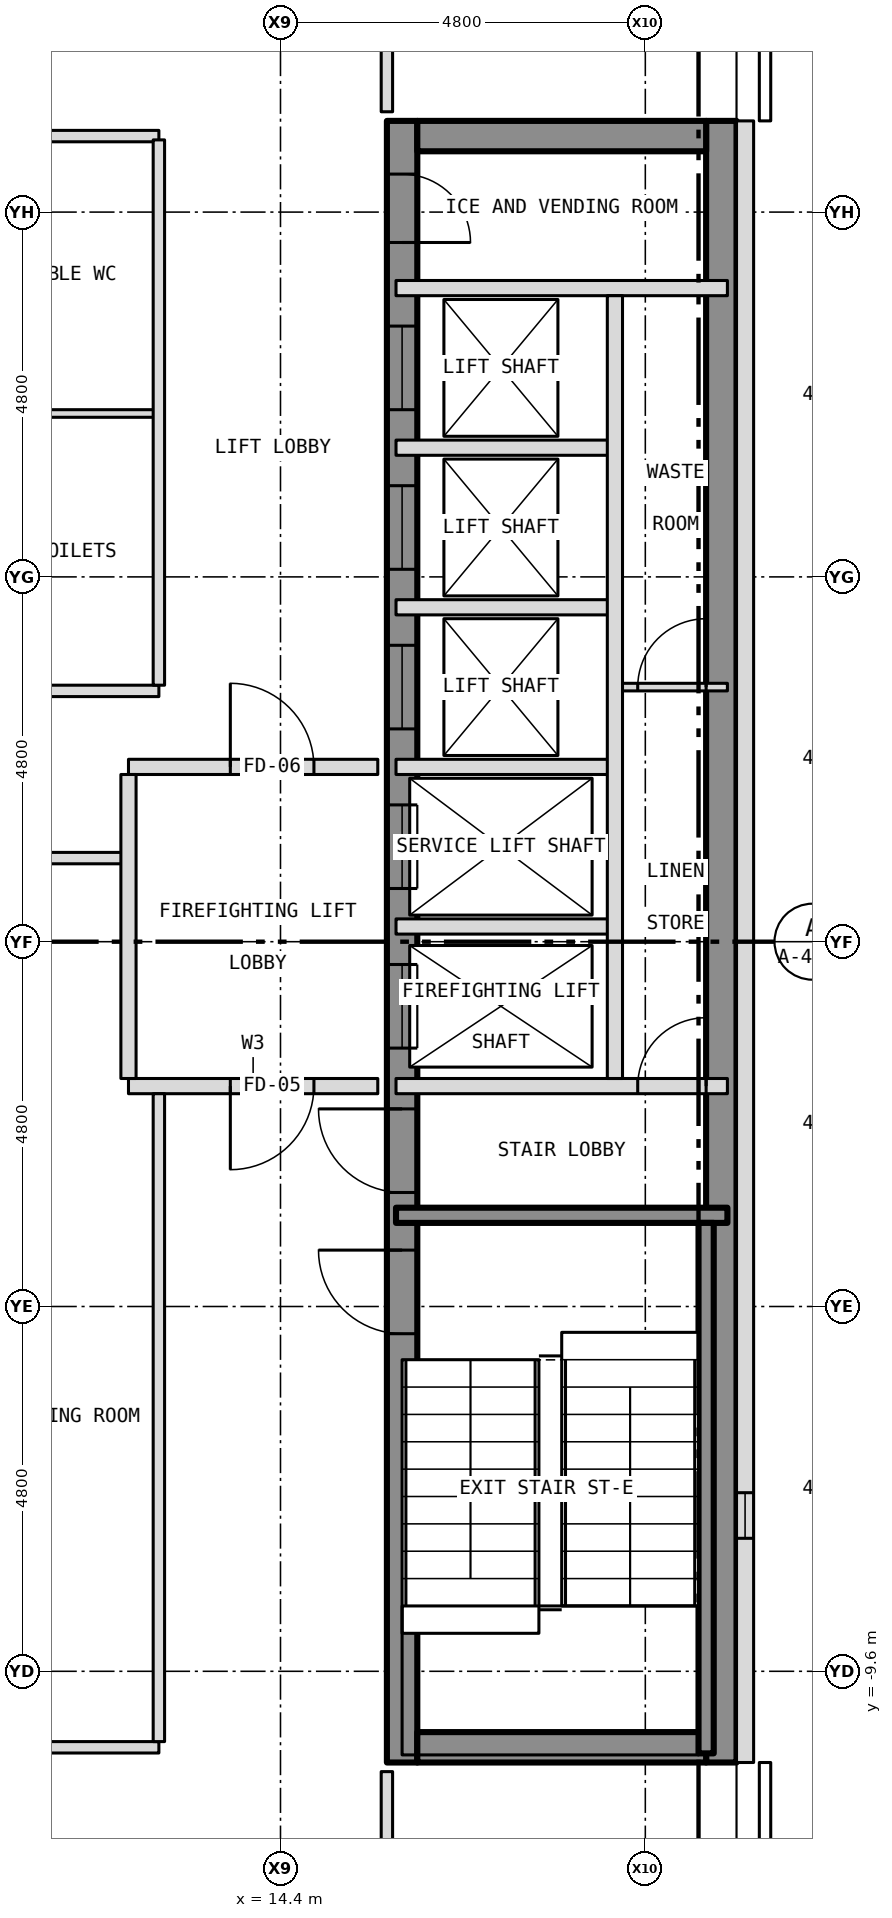
"""IFC4 building model, lengths in metres.
Left out: names, types, materials, properties, quantities, classifications, styles, units other than length and angle.
Written with IfcOpenShell. Run it as: python <this file> out.ifc"""

import sys

from ifc_helpers import new_model, si_unit, direction, frame, frame_2d, origin, place, context, subcontext, project, spatial, rectangle, extrude, element, fill, save


model = new_model("IFC4")
c1 = context("Model", 3, precision=1e-05, world=origin(), true_north=direction((0.0, 1.0)))
c2 = subcontext(c1, "Body", "Model", "MODEL_VIEW")
j1 = project(units=[si_unit("LENGTHUNIT", "METRE"), si_unit("PLANEANGLEUNIT", "RADIAN")], contexts=[c1])
p1 = place(None, origin())
s1 = spatial("IfcSite", under=j1, at=p1, CompositionType="ELEMENT")
p2 = place(p1, origin())
s2 = spatial("IfcBuilding", under=s1, at=p2, CompositionType="ELEMENT")
p3 = place(p2, frame((0.0, 0.0, 248.0)))
s3 = spatial("IfcBuildingStorey", under=s2, at=p3, CompositionType="ELEMENT", Elevation=248.0)
p4 = place(p3, frame((16.0, -10.8, 0.0), z_axis=(0.0, 0.0, 1.0), x_axis=(0.0, 1.0, 0.0)))
e1 = element("IfcWall", 1, at=p4, inside=s3, PredefinedType="SHEAR", context=c2, shape_type="SweptSolid", body=[
    extrude(rectangle(XDim=21.6, YDim=0.4, at=frame_2d((10.8, 0.0))), origin(), (0.0, 0.0, 1.0), 3.25),
])
p5 = place(p4, frame((9.4, 0.0, 0.0)))
e2 = element("IfcOpeningElement", 2, at=p5, cuts=e1, PredefinedType="OPENING", context=c2, shape_type="SweptSolid", body=[
    extrude(rectangle(XDim=1.1, YDim=2.1, at=frame_2d((0.55, 1.05))), frame((0.0, 0.212, 0.0), z_axis=(0.0, -1.0, 0.0), x_axis=(1.0, 0.0, 0.0)), (0.0, 0.0, 1.0), 0.424),
])
p6 = place(p4, frame((11.5, 0.0, 0.0)))
e3 = element("IfcOpeningElement", 3, at=p6, cuts=e1, PredefinedType="OPENING", context=c2, shape_type="SweptSolid", body=[
    extrude(rectangle(XDim=1.1, YDim=2.1, at=frame_2d((0.55, 1.05))), frame((0.0, 0.212, 0.0), z_axis=(0.0, -1.0, 0.0), x_axis=(1.0, 0.0, 0.0)), (0.0, 0.0, 1.0), 0.424),
])
p7 = place(p4, frame((13.6, 0.0, 0.0)))
e4 = element("IfcOpeningElement", 4, at=p7, cuts=e1, PredefinedType="OPENING", context=c2, shape_type="SweptSolid", body=[
    extrude(rectangle(XDim=1.1, YDim=2.1, at=frame_2d((0.55, 1.05))), frame((0.0, 0.212, 0.0), z_axis=(0.0, -1.0, 0.0), x_axis=(1.0, 0.0, 0.0)), (0.0, 0.0, 1.0), 0.424),
])
p8 = place(p4, frame((15.7, 0.0, 0.0)))
e5 = element("IfcOpeningElement", 5, at=p8, cuts=e1, PredefinedType="OPENING", context=c2, shape_type="SweptSolid", body=[
    extrude(rectangle(XDim=1.1, YDim=2.1, at=frame_2d((0.55, 1.05))), frame((0.0, 0.212, 0.0), z_axis=(0.0, -1.0, 0.0), x_axis=(1.0, 0.0, 0.0)), (0.0, 0.0, 1.0), 0.424),
])
p9 = place(p4, frame((17.8, 0.0, 0.0)))
e6 = element("IfcOpeningElement", 6, at=p9, cuts=e1, PredefinedType="OPENING", context=c2, shape_type="SweptSolid", body=[
    extrude(rectangle(XDim=1.1, YDim=2.1, at=frame_2d((0.55, 1.05))), frame((0.0, 0.212, 0.0), z_axis=(0.0, -1.0, 0.0), x_axis=(1.0, 0.0, 0.0)), (0.0, 0.0, 1.0), 0.424),
])
p10 = place(p4, frame((5.642, 0.0, 0.0)))
e7 = element("IfcOpeningElement", 7, at=p10, cuts=e1, PredefinedType="OPENING", context=c2, shape_type="SweptSolid", body=[
    extrude(rectangle(XDim=1.1, YDim=2.1, at=frame_2d((0.55, 1.05))), frame((0.0, 0.212, 0.0), z_axis=(0.0, -1.0, 0.0), x_axis=(1.0, 0.0, 0.0)), (0.0, 0.0, 1.0), 0.424),
])
p11 = place(p4, frame((7.5, 0.0, 0.0)))
e8 = element("IfcOpeningElement", 8, at=p11, cuts=e1, PredefinedType="OPENING", context=c2, shape_type="SweptSolid", body=[
    extrude(rectangle(XDim=1.1, YDim=2.1, at=frame_2d((0.55, 1.05))), frame((0.0, 0.212, 0.0), z_axis=(0.0, -1.0, 0.0), x_axis=(1.0, 0.0, 0.0)), (0.0, 0.0, 1.0), 0.424),
])
p12 = place(p4, frame((20.0, 0.0, 0.0)))
e9 = element("IfcOpeningElement", 9, at=p12, cuts=e1, PredefinedType="OPENING", context=c2, shape_type="SweptSolid", body=[
    extrude(rectangle(XDim=0.9, YDim=2.1, at=frame_2d((0.45, 1.05))), frame((0.0, 0.212, 0.0), z_axis=(0.0, -1.0, 0.0), x_axis=(1.0, 0.0, 0.0)), (0.0, 0.0, 1.0), 0.424),
])
p13 = place(p3, frame((20.2, -10.8, 0.0), z_axis=(0.0, 0.0, 1.0), x_axis=(0.0, 1.0, 0.0)))
e10 = element("IfcWall", 10, at=p13, inside=s3, PredefinedType="SHEAR", context=c2, shape_type="SweptSolid", body=[
    extrude(rectangle(XDim=21.6, YDim=0.4, at=frame_2d((10.8, 0.0))), origin(), (0.0, 0.0, 1.0), 3.25),
])
for number, where, z_axis, x_axis in (
    (11, (16.2, 10.6, 0.0), (0.0, 0.0, 1.0), (1.0, 0.0, 0.0)),
    (12, (16.2, -10.6, 0.0), (0.0, 0.0, 1.0), (1.0, 0.0, 0.0)),
):
    element("IfcWall", number, at=place(p3, frame(where, z_axis=z_axis, x_axis=x_axis)), inside=s3, PredefinedType="SHEAR", context=c2, shape_type="SweptSolid", body=[
        extrude(rectangle(XDim=3.8, YDim=0.4, at=frame_2d((1.9, 0.0))), origin(), (0.0, 0.0, 1.0), 3.25),
    ])
p14 = place(p3, frame((20.512, -10.8, 0.0), z_axis=(0.0, 0.0, 1.0), x_axis=(0.0, 1.0, 0.0)))
e13 = element("IfcWall", 13, at=p14, inside=s3, PredefinedType="SOLIDWALL", context=c2, shape_type="SweptSolid", body=[
    extrude(rectangle(XDim=21.6, YDim=0.225, at=frame_2d((10.8, 0.0))), origin(), (0.0, 0.0, 1.0), 3.5),
])
p15 = place(p14, frame((2.95, 0.0, 1.0)))
e14 = element("IfcOpeningElement", 14, at=p15, cuts=e13, PredefinedType="OPENING", context=c2, shape_type="SweptSolid", body=[
    extrude(rectangle(XDim=0.6, YDim=1.5, at=frame_2d((0.3, 0.75))), frame((0.0, 0.125, 0.0), z_axis=(0.0, -1.0, 0.0), x_axis=(1.0, 0.0, 0.0)), (0.0, 0.0, 1.0), 0.249),
])
p16 = place(p3, frame((9.7, -10.6, 0.0), z_axis=(0.0, 0.0, 1.0), x_axis=(1.0, 0.0, 0.0)))
e15 = element("IfcWall", 15, at=p16, inside=s3, PredefinedType="PARTITIONING", context=c2, shape_type="SweptSolid", body=[
    extrude(rectangle(XDim=3.1, YDim=0.15, at=frame_2d((1.55, 0.0))), origin(), (0.0, 0.0, 1.0), 3.35),
])
p17 = place(p3, frame((15.92, -3.6, 0.0), z_axis=(0.0, 0.0, 1.0), x_axis=(1.0, 0.0, 0.0)))
e16 = element("IfcWall", 16, at=p17, inside=s3, PredefinedType="SHEAR", context=c2, shape_type="SweptSolid", body=[
    extrude(rectangle(XDim=4.36, YDim=0.2, at=frame_2d((2.18, 0.0))), origin(), (0.0, 0.0, 1.0), 3.25),
])
p18 = place(p3, frame((12.4, -1.9, 0.0), z_axis=(0.0, 0.0, 1.0), x_axis=(1.0, 0.0, 0.0)))
e17 = element("IfcWall", 17, at=p18, inside=s3, PredefinedType="PARTITIONING", context=c2, shape_type="SweptSolid", body=[
    extrude(rectangle(XDim=3.28, YDim=0.2, at=frame_2d((1.64, 0.0))), origin(), (0.0, 0.0, 1.0), 3.35),
])
p19 = place(p18, frame((1.34, 0.0, 0.0)))
e18 = element("IfcOpeningElement", 18, at=p19, cuts=e17, PredefinedType="OPENING", context=c2, shape_type="SweptSolid", body=[
    extrude(rectangle(XDim=1.1, YDim=2.1, at=frame_2d((0.55, 1.05))), frame((0.0, 0.112, 0.0), z_axis=(0.0, -1.0, 0.0), x_axis=(1.0, 0.0, 0.0)), (0.0, 0.0, 1.0), 0.224),
])
p20 = place(p3, frame((15.92, -1.9, 0.0), z_axis=(0.0, 0.0, 1.0), x_axis=(1.0, 0.0, 0.0)))
e19 = element("IfcWall", 19, at=p20, inside=s3, PredefinedType="PARTITIONING", context=c2, shape_type="SweptSolid", body=[
    extrude(rectangle(XDim=4.36, YDim=0.2, at=frame_2d((2.18, 0.0))), origin(), (0.0, 0.0, 1.0), 3.25),
])
p21 = place(p20, frame((3.18, 0.0, 0.0)))
e20 = element("IfcOpeningElement", 20, at=p21, cuts=e19, PredefinedType="OPENING", context=c2, shape_type="SweptSolid", body=[
    extrude(rectangle(XDim=0.9, YDim=2.1, at=frame_2d((0.45, 1.05))), frame((0.0, 0.112, 0.0), z_axis=(0.0, -1.0, 0.0), x_axis=(1.0, 0.0, 0.0)), (0.0, 0.0, 1.0), 0.224),
])
p22 = place(p3, frame((15.92, 0.2, 0.0), z_axis=(0.0, 0.0, 1.0), x_axis=(1.0, 0.0, 0.0)))
e21 = element("IfcWall", 21, at=p22, inside=s3, PredefinedType="PARTITIONING", context=c2, shape_type="SweptSolid", body=[
    extrude(rectangle(XDim=2.88, YDim=0.2, at=frame_2d((1.44, 0.0))), origin(), (0.0, 0.0, 1.0), 3.25),
])
p23 = place(p3, frame((9.7, 1.1, 0.0), z_axis=(0.0, 0.0, 1.0), x_axis=(1.0, 0.0, 0.0)))
e22 = element("IfcWall", 22, at=p23, inside=s3, PredefinedType="PARTITIONING", context=c2, shape_type="SweptSolid", body=[
    extrude(rectangle(XDim=2.7, YDim=0.15, at=frame_2d((1.35, 0.0))), origin(), (0.0, 0.0, 1.0), 3.35),
])
p24 = place(p3, frame((12.4, 2.3, 0.0), z_axis=(0.0, 0.0, 1.0), x_axis=(1.0, 0.0, 0.0)))
e23 = element("IfcWall", 23, at=p24, inside=s3, PredefinedType="PARTITIONING", context=c2, shape_type="SweptSolid", body=[
    extrude(rectangle(XDim=3.28, YDim=0.2, at=frame_2d((1.64, 0.0))), origin(), (0.0, 0.0, 1.0), 3.35),
])
p25 = place(p24, frame((1.34, 0.0, 0.0)))
e24 = element("IfcOpeningElement", 24, at=p25, cuts=e23, PredefinedType="OPENING", context=c2, shape_type="SweptSolid", body=[
    extrude(rectangle(XDim=1.1, YDim=2.1, at=frame_2d((0.55, 1.05))), frame((0.0, 0.112, 0.0), z_axis=(0.0, -1.0, 0.0), x_axis=(1.0, 0.0, 0.0)), (0.0, 0.0, 1.0), 0.224),
])
p26 = place(p3, frame((15.92, 2.3, 0.0), z_axis=(0.0, 0.0, 1.0), x_axis=(1.0, 0.0, 0.0)))
e25 = element("IfcWall", 25, at=p26, inside=s3, PredefinedType="PARTITIONING", context=c2, shape_type="SweptSolid", body=[
    extrude(rectangle(XDim=2.88, YDim=0.2, at=frame_2d((1.44, 0.0))), origin(), (0.0, 0.0, 1.0), 3.25),
])
p27 = place(p3, frame((9.7, 3.3, 0.0), z_axis=(0.0, 0.0, 1.0), x_axis=(1.0, 0.0, 0.0)))
e26 = element("IfcWall", 26, at=p27, inside=s3, PredefinedType="PARTITIONING", context=c2, shape_type="SweptSolid", body=[
    extrude(rectangle(XDim=3.1, YDim=0.15, at=frame_2d((1.55, 0.0))), origin(), (0.0, 0.0, 1.0), 3.35),
])
p28 = place(p3, frame((18.8, 3.35, 0.0), z_axis=(0.0, 0.0, 1.0), x_axis=(1.0, 0.0, 0.0)))
e27 = element("IfcWall", 27, at=p28, inside=s3, PredefinedType="PARTITIONING", context=c2, shape_type="SweptSolid", body=[
    extrude(rectangle(XDim=1.48, YDim=0.1, at=frame_2d((0.74, 0.0))), origin(), (0.0, 0.0, 1.0), 3.25),
])
p29 = place(p28, frame((0.3, 0.0, 0.0)))
e28 = element("IfcOpeningElement", 28, at=p29, cuts=e27, PredefinedType="OPENING", context=c2, shape_type="SweptSolid", body=[
    extrude(rectangle(XDim=0.9, YDim=2.1, at=frame_2d((0.45, 1.05))), frame((0.0, 0.062, 0.0), z_axis=(0.0, -1.0, 0.0), x_axis=(1.0, 0.0, 0.0)), (0.0, 0.0, 1.0), 0.124),
])
for number, where, z_axis, x_axis in (
    (29, (15.92, 4.4, 0.0), (0.0, 0.0, 1.0), (1.0, 0.0, 0.0)),
    (30, (15.92, 6.5, 0.0), (0.0, 0.0, 1.0), (1.0, 0.0, 0.0)),
):
    element("IfcWall", number, at=place(p3, frame(where, z_axis=z_axis, x_axis=x_axis)), inside=s3, PredefinedType="PARTITIONING", context=c2, shape_type="SweptSolid", body=[
        extrude(rectangle(XDim=2.88, YDim=0.2, at=frame_2d((1.44, 0.0))), origin(), (0.0, 0.0, 1.0), 3.25),
    ])
p30 = place(p3, frame((9.7, 6.95, 0.0), z_axis=(0.0, 0.0, 1.0), x_axis=(1.0, 0.0, 0.0)))
e31 = element("IfcWall", 31, at=p30, inside=s3, PredefinedType="PARTITIONING", context=c2, shape_type="SweptSolid", body=[
    extrude(rectangle(XDim=3.1, YDim=0.1, at=frame_2d((1.55, 0.0))), origin(), (0.0, 0.0, 1.0), 3.35),
])
p31 = place(p3, frame((15.92, 8.6, 0.0), z_axis=(0.0, 0.0, 1.0), x_axis=(1.0, 0.0, 0.0)))
e32 = element("IfcWall", 32, at=p31, inside=s3, PredefinedType="PARTITIONING", context=c2, shape_type="SweptSolid", body=[
    extrude(rectangle(XDim=4.36, YDim=0.2, at=frame_2d((2.18, 0.0))), origin(), (0.0, 0.0, 1.0), 3.25),
])
p32 = place(p3, frame((9.7, 10.6, 0.0), z_axis=(0.0, 0.0, 1.0), x_axis=(1.0, 0.0, 0.0)))
e33 = element("IfcWall", 33, at=p32, inside=s3, PredefinedType="PARTITIONING", context=c2, shape_type="SweptSolid", body=[
    extrude(rectangle(XDim=3.1, YDim=0.15, at=frame_2d((1.55, 0.0))), origin(), (0.0, 0.0, 1.0), 3.35),
])
p33 = place(p3, frame((12.4, -1.8, 0.0), z_axis=(0.0, 0.0, 1.0), x_axis=(0.0, 1.0, 0.0)))
e34 = element("IfcWall", 34, at=p33, inside=s3, PredefinedType="PARTITIONING", context=c2, shape_type="SweptSolid", body=[
    extrude(rectangle(XDim=4.0, YDim=0.2, at=frame_2d((2.0, 0.0))), origin(), (0.0, 0.0, 1.0), 3.35),
])
p34 = place(p3, frame((12.8, -10.525, 0.0), z_axis=(0.0, 0.0, 1.0), x_axis=(0.0, 1.0, 0.0)))
e35 = element("IfcWall", 35, at=p34, inside=s3, PredefinedType="PARTITIONING", context=c2, shape_type="SweptSolid", body=[
    extrude(rectangle(XDim=8.525, YDim=0.15, at=frame_2d((4.262, 0.0))), origin(), (0.0, 0.0, 1.0), 3.35),
])
p35 = place(p3, frame((12.8, 3.375, 0.0), z_axis=(0.0, 0.0, 1.0), x_axis=(0.0, 1.0, 0.0)))
e36 = element("IfcWall", 36, at=p35, inside=s3, PredefinedType="PARTITIONING", context=c2, shape_type="SweptSolid", body=[
    extrude(rectangle(XDim=7.175, YDim=0.15, at=frame_2d((3.587, 0.0))), origin(), (0.0, 0.0, 1.0), 3.35),
])
for number, where, z_axis, x_axis in (
    (37, (15.8, -12.725, 0.0), (0.0, 0.0, 1.0), (0.0, 1.0, 0.0)),
    (38, (15.8, 10.92, 0.0), (0.0, 0.0, 1.0), (0.0, 1.0, 0.0)),
):
    element("IfcWall", number, at=place(p3, frame(where, z_axis=z_axis, x_axis=x_axis)), inside=s3, PredefinedType="PARTITIONING", context=c2, shape_type="SweptSolid", body=[
        extrude(rectangle(XDim=1.805, YDim=0.15, at=frame_2d((0.903, 0.0))), origin(), (0.0, 0.0, 1.0), 3.35),
    ])
p36 = place(p3, frame((18.8, -1.8, 0.0), z_axis=(0.0, 0.0, 1.0), x_axis=(0.0, 1.0, 0.0)))
e39 = element("IfcWall", 39, at=p36, inside=s3, PredefinedType="PARTITIONING", context=c2, shape_type="SweptSolid", body=[
    extrude(rectangle(XDim=10.3, YDim=0.2, at=frame_2d((5.15, 0.0))), origin(), (0.0, 0.0, 1.0), 3.25),
])
p37 = place(p3, frame((20.0, -10.68, 0.0), z_axis=(0.0, 0.0, 1.0), x_axis=(0.0, 1.0, 0.0)))
e40 = element("IfcWall", 40, at=p37, inside=s3, PredefinedType="SHEAR", context=c2, shape_type="SweptSolid", body=[
    extrude(rectangle(XDim=6.98, YDim=0.2, at=frame_2d((3.49, 0.0))), origin(), (0.0, 0.0, 1.0), 3.25),
])
p38 = place(p15, origin())
e41 = element("IfcWindow", 41, at=p38, inside=s3, PartitioningType="SINGLE_PANEL", PredefinedType="WINDOW", context=c2, shape_type="SweptSolid", body=[
    extrude(rectangle(XDim=0.6, YDim=1.5, at=frame_2d((0.3, 0.75))), frame((0.0, -0.022, 0.0), z_axis=(0.0, -1.0, 0.0), x_axis=(1.0, 0.0, 0.0)), (0.0, 0.0, 1.0), 0.06),
])
fill(e14, e41)
p39 = place(p5, origin())
e42 = element("IfcDoor", 42, at=p39, inside=s3, OperationType="SLIDING_TO_LEFT", PredefinedType="DOOR", context=c2, shape_type="SweptSolid", body=[
    extrude(rectangle(XDim=1.1, YDim=2.1, at=frame_2d((0.55, 1.05))), frame((0.0, 0.025, 0.0), z_axis=(0.0, -1.0, 0.0), x_axis=(1.0, 0.0, 0.0)), (0.0, 0.0, 1.0), 0.05),
])
fill(e2, e42)
p40 = place(p6, origin())
e43 = element("IfcDoor", 43, at=p40, inside=s3, OperationType="SLIDING_TO_LEFT", PredefinedType="DOOR", context=c2, shape_type="SweptSolid", body=[
    extrude(rectangle(XDim=1.1, YDim=2.1, at=frame_2d((0.55, 1.05))), frame((0.0, 0.025, 0.0), z_axis=(0.0, -1.0, 0.0), x_axis=(1.0, 0.0, 0.0)), (0.0, 0.0, 1.0), 0.05),
])
fill(e3, e43)
p41 = place(p7, origin())
e44 = element("IfcDoor", 44, at=p41, inside=s3, OperationType="SLIDING_TO_LEFT", PredefinedType="DOOR", context=c2, shape_type="SweptSolid", body=[
    extrude(rectangle(XDim=1.1, YDim=2.1, at=frame_2d((0.55, 1.05))), frame((0.0, 0.025, 0.0), z_axis=(0.0, -1.0, 0.0), x_axis=(1.0, 0.0, 0.0)), (0.0, 0.0, 1.0), 0.05),
])
fill(e4, e44)
p42 = place(p8, origin())
e45 = element("IfcDoor", 45, at=p42, inside=s3, OperationType="SLIDING_TO_LEFT", PredefinedType="DOOR", context=c2, shape_type="SweptSolid", body=[
    extrude(rectangle(XDim=1.1, YDim=2.1, at=frame_2d((0.55, 1.05))), frame((0.0, 0.025, 0.0), z_axis=(0.0, -1.0, 0.0), x_axis=(1.0, 0.0, 0.0)), (0.0, 0.0, 1.0), 0.05),
])
fill(e5, e45)
p43 = place(p9, origin())
e46 = element("IfcDoor", 46, at=p43, inside=s3, OperationType="SLIDING_TO_LEFT", PredefinedType="DOOR", context=c2, shape_type="SweptSolid", body=[
    extrude(rectangle(XDim=1.1, YDim=2.1, at=frame_2d((0.55, 1.05))), frame((0.0, 0.025, 0.0), z_axis=(0.0, -1.0, 0.0), x_axis=(1.0, 0.0, 0.0)), (0.0, 0.0, 1.0), 0.05),
])
fill(e6, e46)
p44 = place(p10, origin())
e47 = element("IfcDoor", 47, at=p44, inside=s3, OperationType="SINGLE_SWING_RIGHT", PredefinedType="DOOR", context=c2, shape_type="SweptSolid", body=[
    extrude(rectangle(XDim=1.1, YDim=2.1, at=frame_2d((0.55, 1.05))), frame((0.0, 0.025, 0.0), z_axis=(0.0, -1.0, 0.0), x_axis=(1.0, 0.0, 0.0)), (0.0, 0.0, 1.0), 0.05),
])
fill(e7, e47)
p45 = place(p11, origin())
e48 = element("IfcDoor", 48, at=p45, inside=s3, OperationType="SINGLE_SWING_RIGHT", PredefinedType="DOOR", context=c2, shape_type="SweptSolid", body=[
    extrude(rectangle(XDim=1.1, YDim=2.1, at=frame_2d((0.55, 1.05))), frame((0.0, 0.025, 0.0), z_axis=(0.0, -1.0, 0.0), x_axis=(1.0, 0.0, 0.0)), (0.0, 0.0, 1.0), 0.05),
])
fill(e8, e48)
p46 = place(p12, origin())
e49 = element("IfcDoor", 49, at=p46, inside=s3, OperationType="SINGLE_SWING_LEFT", PredefinedType="DOOR", context=c2, shape_type="SweptSolid", body=[
    extrude(rectangle(XDim=0.9, YDim=2.1, at=frame_2d((0.45, 1.05))), frame((0.0, 0.025, 0.0), z_axis=(0.0, -1.0, 0.0), x_axis=(1.0, 0.0, 0.0)), (0.0, 0.0, 1.0), 0.05),
])
fill(e9, e49)
p47 = place(p21, origin())
e50 = element("IfcDoor", 50, at=p47, inside=s3, OperationType="SINGLE_SWING_RIGHT", PredefinedType="DOOR", context=c2, shape_type="SweptSolid", body=[
    extrude(rectangle(XDim=0.9, YDim=2.1, at=frame_2d((0.45, 1.05))), frame((0.0, 0.025, 0.0), z_axis=(0.0, -1.0, 0.0), x_axis=(1.0, 0.0, 0.0)), (0.0, 0.0, 1.0), 0.05),
])
fill(e20, e50)
p48 = place(p29, origin())
e51 = element("IfcDoor", 51, at=p48, inside=s3, OperationType="SINGLE_SWING_RIGHT", PredefinedType="DOOR", context=c2, shape_type="SweptSolid", body=[
    extrude(rectangle(XDim=0.9, YDim=2.1, at=frame_2d((0.45, 1.05))), frame((0.0, 0.025, 0.0), z_axis=(0.0, -1.0, 0.0), x_axis=(1.0, 0.0, 0.0)), (0.0, 0.0, 1.0), 0.05),
])
fill(e28, e51)
p49 = place(p19, origin())
e52 = element("IfcDoor", 52, at=p49, inside=s3, OperationType="SINGLE_SWING_LEFT", PredefinedType="DOOR", context=c2, shape_type="SweptSolid", body=[
    extrude(rectangle(XDim=1.1, YDim=2.1, at=frame_2d((0.55, 1.05))), frame((0.0, 0.025, 0.0), z_axis=(0.0, -1.0, 0.0), x_axis=(1.0, 0.0, 0.0)), (0.0, 0.0, 1.0), 0.05),
])
fill(e18, e52)
p50 = place(p25, origin())
e53 = element("IfcDoor", 53, at=p50, inside=s3, OperationType="SINGLE_SWING_LEFT", PredefinedType="DOOR", context=c2, shape_type="SweptSolid", body=[
    extrude(rectangle(XDim=1.1, YDim=2.1, at=frame_2d((0.55, 1.05))), frame((0.0, 0.025, 0.0), z_axis=(0.0, -1.0, 0.0), x_axis=(1.0, 0.0, 0.0)), (0.0, 0.0, 1.0), 0.05),
])
fill(e24, e53)
save(model, sys.argv[1])
